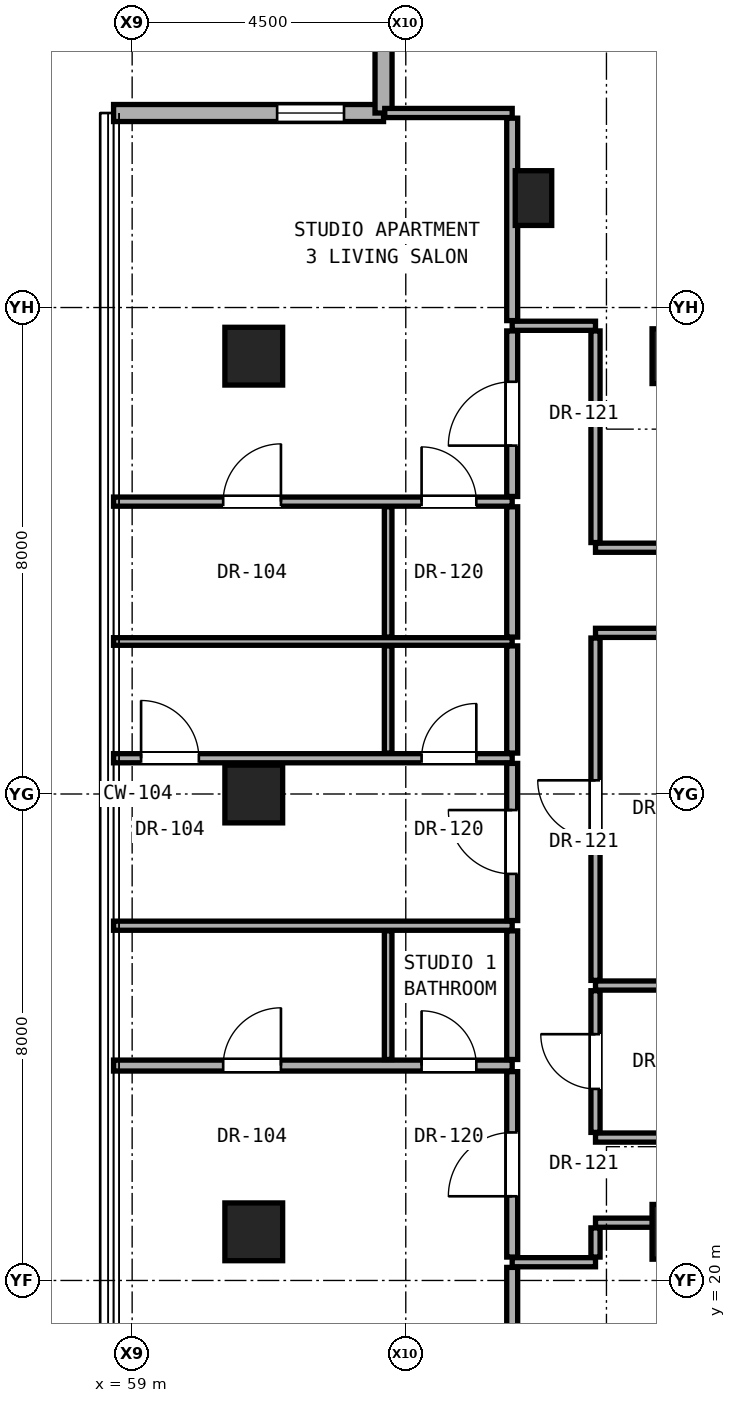
"""IFC4 building model, lengths in metres.
Left out: names, types, materials, properties, quantities, classifications, styles, units other than length and angle.
Written with IfcOpenShell. Run it as: python <this file> out.ifc"""

import sys

from ifc_helpers import new_model, si_unit, direction, frame, frame_2d, origin, origin_2d, place, context, subcontext, project, spatial, rectangle, hollow_rectangle, extrude, element, fill, save


model = new_model("IFC4")
c1 = context("Model", 3, precision=1e-05, world=origin(), true_north=direction((0.0, 1.0)))
c2 = subcontext(c1, "Body", "Model", "MODEL_VIEW")
j1 = project(units=[si_unit("LENGTHUNIT", "METRE"), si_unit("PLANEANGLEUNIT", "RADIAN")], contexts=[c1])
p1 = place(None, origin())
s1 = spatial("IfcSite", under=j1, at=p1, CompositionType="ELEMENT")
p2 = place(p1, origin())
s2 = spatial("IfcBuilding", under=s1, at=p2, CompositionType="ELEMENT")
p3 = place(p2, frame((0.0, 0.0, 203.15)))
s3 = spatial("IfcBuildingStorey", under=s2, at=p3, CompositionType="ELEMENT", Elevation=203.15)
for number, where, z_axis, x_axis in (
    (1, (68.0, 20.8, 0.0), (0.0, 0.0, 1.0), (1.0, 0.0, 0.0)),
    (2, (68.0, 35.2, 0.0), (0.0, 0.0, 1.0), (1.0, 0.0, 0.0)),
):
    element("IfcColumn", number, at=place(p3, frame(where, z_axis=z_axis, x_axis=x_axis)), inside=s3, PredefinedType="COLUMN", context=c2, shape_type="SweptSolid", body=[
        extrude(rectangle(XDim=0.9, YDim=0.9, at=origin_2d()), origin(), (0.0, 0.0, 1.0), 3.25),
    ])
for number, where, z_axis, x_axis in (
    (3, (61.0, 20.8, 0.0), (0.0, 0.0, 1.0), (1.0, 0.0, 0.0)),
    (4, (61.0, 28.0, 0.0), (0.0, 0.0, 1.0), (1.0, 0.0, 0.0)),
    (5, (61.0, 35.2, 0.0), (0.0, 0.0, 1.0), (1.0, 0.0, 0.0)),
):
    element("IfcColumn", number, at=place(p3, frame(where, z_axis=z_axis, x_axis=x_axis)), inside=s3, PredefinedType="COLUMN", context=c2, shape_type="SweptSolid", body=[
        extrude(hollow_rectangle(XDim=0.95, YDim=0.95, WallThickness=0.05, at=origin_2d()), origin(), (0.0, 0.0, 1.0), 3.25),
    ])
p4 = place(p3, frame((65.6, 37.8, 0.0), z_axis=(0.0, 0.0, 1.0), x_axis=(1.0, 0.0, 0.0)))
e6 = element("IfcColumn", 6, at=p4, inside=s3, PredefinedType="PILASTER", context=c2, shape_type="SweptSolid", body=[
    extrude(rectangle(XDim=0.6, YDim=0.9, at=origin_2d()), origin(), (0.0, 0.0, 1.0), 3.25),
])
p5 = place(p3, frame((63.134, 39.198, 0.0), z_axis=(0.0, 0.0, 1.0), x_axis=(-1.0, 0.0, 0.0)))
e7 = element("IfcWall", 7, at=p5, inside=s3, PredefinedType="SOLIDWALL", context=c2, shape_type="SweptSolid", body=[
    extrude(rectangle(XDim=4.44, YDim=0.28, at=frame_2d((2.22, 0.0))), origin(), (0.0, 0.0, 1.0), 3.03),
])
p6 = place(p5, frame((0.65, 0.0, 0.85)))
e8 = element("IfcOpeningElement", 8, at=p6, cuts=e7, PredefinedType="OPENING", context=c2, shape_type="SweptSolid", body=[
    extrude(rectangle(XDim=1.1, YDim=2.0, at=frame_2d((0.55, 1.0))), frame((0.0, 0.15, 0.0), z_axis=(0.0, -1.0, 0.0), x_axis=(1.0, 0.0, 0.0)), (0.0, 0.0, 1.0), 0.3),
])
p7 = place(p3, frame((63.134, 43.638, 0.0), z_axis=(0.0, 0.0, 1.0), x_axis=(0.0, -1.0, 0.0)))
e9 = element("IfcWall", 9, at=p7, inside=s3, PredefinedType="SOLIDWALL", context=c2, shape_type="SweptSolid", body=[
    extrude(rectangle(XDim=4.44, YDim=0.28, at=frame_2d((2.22, 0.0))), origin(), (0.0, 0.0, 1.0), 3.03),
])
p8 = place(p3, frame((65.25, 20.3, 0.0), z_axis=(0.0, 0.0, 1.0), x_axis=(1.0, 0.0, 0.0)))
e10 = element("IfcWall", 10, at=p8, inside=s3, PredefinedType="PARTITIONING", context=c2, shape_type="SweptSolid", body=[
    extrude(rectangle(XDim=1.37, YDim=0.15, at=frame_2d((0.685, 0.0))), origin(), (0.0, 0.0, 1.0), 3.05),
])
p9 = place(p3, frame((66.62, 20.95, 0.0), z_axis=(0.0, 0.0, 1.0), x_axis=(1.0, 0.0, 0.0)))
e11 = element("IfcWall", 11, at=p9, inside=s3, PredefinedType="PARTITIONING", context=c2, shape_type="SweptSolid", body=[
    extrude(rectangle(XDim=1.11, YDim=0.15, at=frame_2d((0.555, 0.0))), origin(), (0.0, 0.0, 1.0), 2.442),
])
p10 = place(p3, frame((66.62, 22.35, 0.0), z_axis=(0.0, 0.0, 1.0), x_axis=(1.0, 0.0, 0.0)))
e12 = element("IfcWall", 12, at=p10, inside=s3, PredefinedType="PARTITIONING", context=c2, shape_type="SweptSolid", body=[
    extrude(rectangle(XDim=10.14, YDim=0.15, at=frame_2d((5.07, 0.0))), origin(), (0.0, 0.0, 1.0), 2.186),
])
p11 = place(p3, frame((58.694, 23.534, 0.0), z_axis=(0.0, 0.0, 1.0), x_axis=(1.0, 0.0, 0.0)))
e13 = element("IfcWall", 13, at=p11, inside=s3, PredefinedType="PARTITIONING", context=c2, shape_type="SweptSolid", body=[
    extrude(rectangle(XDim=6.556, YDim=0.18, at=frame_2d((3.278, 0.0))), origin(), (0.0, 0.0, 1.0), 2.269),
])
p12 = place(p11, frame((1.803, 0.0, 0.0)))
e14 = element("IfcOpeningElement", 14, at=p12, cuts=e13, PredefinedType="OPENING", context=c2, shape_type="SweptSolid", body=[
    extrude(rectangle(XDim=0.95, YDim=2.15, at=frame_2d((0.475, 1.075))), frame((0.0, 0.1, 0.0), z_axis=(0.0, -1.0, 0.0), x_axis=(1.0, 0.0, 0.0)), (0.0, 0.0, 1.0), 0.2),
])
p13 = place(p11, frame((5.066, 0.0, 0.0)))
e15 = element("IfcOpeningElement", 15, at=p13, cuts=e13, PredefinedType="OPENING", context=c2, shape_type="SweptSolid", body=[
    extrude(rectangle(XDim=0.9, YDim=2.1, at=frame_2d((0.45, 1.05))), frame((0.0, 0.1, 0.0), z_axis=(0.0, -1.0, 0.0), x_axis=(1.0, 0.0, 0.0)), (0.0, 0.0, 1.0), 0.2),
])
p14 = place(p3, frame((66.62, 24.85, 0.0), z_axis=(0.0, 0.0, 1.0), x_axis=(1.0, 0.0, 0.0)))
e16 = element("IfcWall", 16, at=p14, inside=s3, PredefinedType="PARTITIONING", context=c2, shape_type="SweptSolid", body=[
    extrude(rectangle(XDim=3.13, YDim=0.15, at=frame_2d((1.565, 0.0))), origin(), (0.0, 0.0, 1.0), 2.186),
])
p15 = place(p3, frame((58.694, 25.834, 0.0), z_axis=(0.0, 0.0, 1.0), x_axis=(1.0, 0.0, 0.0)))
e17 = element("IfcWall", 17, at=p15, inside=s3, PredefinedType="PARTITIONING", context=c2, shape_type="SweptSolid", body=[
    extrude(rectangle(XDim=6.556, YDim=0.15, at=frame_2d((3.278, 0.0))), origin(), (0.0, 0.0, 1.0), 2.269),
])
p16 = place(p3, frame((58.694, 28.588, 0.0), z_axis=(0.0, 0.0, 1.0), x_axis=(1.0, 0.0, 0.0)))
e18 = element("IfcWall", 18, at=p16, inside=s3, PredefinedType="PARTITIONING", context=c2, shape_type="SweptSolid", body=[
    extrude(rectangle(XDim=6.556, YDim=0.15, at=frame_2d((3.278, 0.0))), origin(), (0.0, 0.0, 1.0), 2.269),
])
p17 = place(p16, frame((0.453, 0.0, 0.0)))
e19 = element("IfcOpeningElement", 19, at=p17, cuts=e18, PredefinedType="OPENING", context=c2, shape_type="SweptSolid", body=[
    extrude(rectangle(XDim=0.95, YDim=2.15, at=frame_2d((0.475, 1.075))), frame((0.0, 0.085, 0.0), z_axis=(0.0, -1.0, 0.0), x_axis=(1.0, 0.0, 0.0)), (0.0, 0.0, 1.0), 0.17),
])
p18 = place(p16, frame((5.066, 0.0, 0.0)))
e20 = element("IfcOpeningElement", 20, at=p18, cuts=e18, PredefinedType="OPENING", context=c2, shape_type="SweptSolid", body=[
    extrude(rectangle(XDim=0.9, YDim=2.1, at=frame_2d((0.45, 1.05))), frame((0.0, 0.085, 0.0), z_axis=(0.0, -1.0, 0.0), x_axis=(1.0, 0.0, 0.0)), (0.0, 0.0, 1.0), 0.17),
])
p19 = place(p3, frame((58.694, 30.508, 0.0), z_axis=(0.0, 0.0, 1.0), x_axis=(1.0, 0.0, 0.0)))
e21 = element("IfcWall", 21, at=p19, inside=s3, PredefinedType="PARTITIONING", context=c2, shape_type="SweptSolid", body=[
    extrude(rectangle(XDim=6.556, YDim=0.125, at=frame_2d((3.278, 0.0))), origin(), (0.0, 0.0, 1.0), 2.269),
])
p20 = place(p3, frame((66.62, 30.65, 0.0), z_axis=(0.0, 0.0, 1.0), x_axis=(1.0, 0.0, 0.0)))
e22 = element("IfcWall", 22, at=p20, inside=s3, PredefinedType="PARTITIONING", context=c2, shape_type="SweptSolid", body=[
    extrude(rectangle(XDim=10.14, YDim=0.15, at=frame_2d((5.07, 0.0))), origin(), (0.0, 0.0, 1.0), 2.186),
])
p21 = place(p20, frame((6.14, 0.0, 0.0)))
e23 = element("IfcOpeningElement", 23, at=p21, cuts=e22, PredefinedType="OPENING", context=c2, shape_type="SweptSolid", body=[
    extrude(rectangle(XDim=0.95, YDim=2.15, at=frame_2d((0.475, 1.075))), frame((0.0, 0.085, 0.0), z_axis=(0.0, -1.0, 0.0), x_axis=(1.0, 0.0, 0.0)), (0.0, 0.0, 1.0), 0.17),
])
p22 = place(p3, frame((66.62, 32.05, 0.0), z_axis=(0.0, 0.0, 1.0), x_axis=(1.0, 0.0, 0.0)))
e24 = element("IfcWall", 24, at=p22, inside=s3, PredefinedType="PARTITIONING", context=c2, shape_type="SweptSolid", body=[
    extrude(rectangle(XDim=2.18, YDim=0.15, at=frame_2d((1.09, 0.0))), origin(), (0.0, 0.0, 1.0), 2.186),
])
p23 = place(p3, frame((58.694, 32.808, 0.0), z_axis=(0.0, 0.0, 1.0), x_axis=(1.0, 0.0, 0.0)))
e25 = element("IfcWall", 25, at=p23, inside=s3, PredefinedType="PARTITIONING", context=c2, shape_type="SweptSolid", body=[
    extrude(rectangle(XDim=6.556, YDim=0.15, at=frame_2d((3.278, 0.0))), origin(), (0.0, 0.0, 1.0), 2.269),
])
p24 = place(p23, frame((1.803, 0.0, 0.0)))
e26 = element("IfcOpeningElement", 26, at=p24, cuts=e25, PredefinedType="OPENING", context=c2, shape_type="SweptSolid", body=[
    extrude(rectangle(XDim=0.95, YDim=2.15, at=frame_2d((0.475, 1.075))), frame((0.0, 0.085, 0.0), z_axis=(0.0, -1.0, 0.0), x_axis=(1.0, 0.0, 0.0)), (0.0, 0.0, 1.0), 0.17),
])
p25 = place(p23, frame((5.066, 0.0, 0.0)))
e27 = element("IfcOpeningElement", 27, at=p25, cuts=e25, PredefinedType="OPENING", context=c2, shape_type="SweptSolid", body=[
    extrude(rectangle(XDim=0.9, YDim=2.1, at=frame_2d((0.45, 1.05))), frame((0.0, 0.085, 0.0), z_axis=(0.0, -1.0, 0.0), x_axis=(1.0, 0.0, 0.0)), (0.0, 0.0, 1.0), 0.17),
])
p26 = place(p3, frame((65.25, 35.7, 0.0), z_axis=(0.0, 0.0, 1.0), x_axis=(1.0, 0.0, 0.0)))
e28 = element("IfcWall", 28, at=p26, inside=s3, PredefinedType="PARTITIONING", context=c2, shape_type="SweptSolid", body=[
    extrude(rectangle(XDim=1.37, YDim=0.15, at=frame_2d((0.685, 0.0))), origin(), (0.0, 0.0, 1.0), 3.05),
])
p27 = place(p3, frame((63.154, 39.199, 0.0), z_axis=(0.0, 0.0, 1.0), x_axis=(1.0, 0.0, 0.0)))
e29 = element("IfcWall", 29, at=p27, inside=s3, PredefinedType="PARTITIONING", context=c2, shape_type="SweptSolid", body=[
    extrude(rectangle(XDim=2.096, YDim=0.15, at=frame_2d((1.048, 0.0))), origin(), (0.0, 0.0, 1.0), 3.05),
])
p28 = place(p3, frame((63.21, 23.634, 0.0), z_axis=(0.0, 0.0, 1.0), x_axis=(0.0, 1.0, 0.0)))
e30 = element("IfcWall", 30, at=p28, inside=s3, PredefinedType="PARTITIONING", context=c2, shape_type="SweptSolid", body=[
    extrude(rectangle(XDim=2.115, YDim=0.125, at=frame_2d((1.058, 0.0))), origin(), (0.0, 0.0, 1.0), 3.05),
])
p29 = place(p3, frame((63.21, 28.673, 0.0), z_axis=(0.0, 0.0, 1.0), x_axis=(0.0, 1.0, 0.0)))
e31 = element("IfcWall", 31, at=p29, inside=s3, PredefinedType="PARTITIONING", context=c2, shape_type="SweptSolid", body=[
    extrude(rectangle(XDim=1.762, YDim=0.125, at=frame_2d((0.881, 0.0))), origin(), (0.0, 0.0, 1.0), 3.05),
])
p30 = place(p3, frame((63.21, 30.581, 0.0), z_axis=(0.0, 0.0, 1.0), x_axis=(0.0, 1.0, 0.0)))
e32 = element("IfcWall", 32, at=p30, inside=s3, PredefinedType="PARTITIONING", context=c2, shape_type="SweptSolid", body=[
    extrude(rectangle(XDim=2.142, YDim=0.125, at=frame_2d((1.071, 0.0))), origin(), (0.0, 0.0, 1.0), 3.05),
])
p31 = place(p3, frame((65.25, 16.901, 0.0), z_axis=(0.0, 0.0, 1.0), x_axis=(0.0, 1.0, 0.0)))
e33 = element("IfcWall", 33, at=p31, inside=s3, PredefinedType="PARTITIONING", context=c2, shape_type="SweptSolid", body=[
    extrude(rectangle(XDim=3.314, YDim=0.18, at=frame_2d((1.657, 0.0))), origin(), (0.0, 0.0, 1.0), 2.493),
])
p32 = place(p3, frame((65.25, 20.385, 0.0), z_axis=(0.0, 0.0, 1.0), x_axis=(0.0, 1.0, 0.0)))
e34 = element("IfcWall", 34, at=p32, inside=s3, PredefinedType="PARTITIONING", context=c2, shape_type="SweptSolid", body=[
    extrude(rectangle(XDim=3.049, YDim=0.18, at=frame_2d((1.524, 0.0))), origin(), (0.0, 0.0, 1.0), 2.442),
])
p33 = place(p32, frame((1.0, 0.0, 0.0)))
e35 = element("IfcOpeningElement", 35, at=p33, cuts=e34, PredefinedType="OPENING", context=c2, shape_type="SweptSolid", body=[
    extrude(rectangle(XDim=1.05, YDim=2.2, at=frame_2d((0.525, 1.1))), frame((0.0, 0.1, 0.0), z_axis=(0.0, -1.0, 0.0), x_axis=(1.0, 0.0, 0.0)), (0.0, 0.0, 1.0), 0.2),
])
p34 = place(p3, frame((65.25, 23.634, 0.0), z_axis=(0.0, 0.0, 1.0), x_axis=(0.0, 1.0, 0.0)))
e36 = element("IfcWall", 36, at=p34, inside=s3, PredefinedType="PARTITIONING", context=c2, shape_type="SweptSolid", body=[
    extrude(rectangle(XDim=2.115, YDim=0.18, at=frame_2d((1.058, 0.0))), origin(), (0.0, 0.0, 1.0), 3.05),
])
p35 = place(p3, frame((65.25, 25.919, 0.0), z_axis=(0.0, 0.0, 1.0), x_axis=(0.0, 1.0, 0.0)))
e37 = element("IfcWall", 37, at=p35, inside=s3, PredefinedType="PARTITIONING", context=c2, shape_type="SweptSolid", body=[
    extrude(rectangle(XDim=2.584, YDim=0.18, at=frame_2d((1.292, 0.0))), origin(), (0.0, 0.0, 1.0), 2.346),
])
p36 = place(p35, frame((0.767, 0.0, 0.0)))
e38 = element("IfcOpeningElement", 38, at=p36, cuts=e37, PredefinedType="OPENING", context=c2, shape_type="SweptSolid", body=[
    extrude(rectangle(XDim=1.05, YDim=2.2, at=frame_2d((0.525, 1.1))), frame((0.0, 0.1, 0.0), z_axis=(0.0, -1.0, 0.0), x_axis=(1.0, 0.0, 0.0)), (0.0, 0.0, 1.0), 0.2),
])
p37 = place(p3, frame((65.25, 28.673, 0.0), z_axis=(0.0, 0.0, 1.0), x_axis=(0.0, 1.0, 0.0)))
e39 = element("IfcWall", 39, at=p37, inside=s3, PredefinedType="PARTITIONING", context=c2, shape_type="SweptSolid", body=[
    extrude(rectangle(XDim=1.762, YDim=0.18, at=frame_2d((0.881, 0.0))), origin(), (0.0, 0.0, 1.0), 3.05),
])
p38 = place(p3, frame((65.25, 30.581, 0.0), z_axis=(0.0, 0.0, 1.0), x_axis=(0.0, 1.0, 0.0)))
e40 = element("IfcWall", 40, at=p38, inside=s3, PredefinedType="PARTITIONING", context=c2, shape_type="SweptSolid", body=[
    extrude(rectangle(XDim=2.142, YDim=0.18, at=frame_2d((1.071, 0.0))), origin(), (0.0, 0.0, 1.0), 3.05),
])
p39 = place(p3, frame((65.25, 32.893, 0.0), z_axis=(0.0, 0.0, 1.0), x_axis=(0.0, 1.0, 0.0)))
e41 = element("IfcWall", 41, at=p39, inside=s3, PredefinedType="PARTITIONING", context=c2, shape_type="SweptSolid", body=[
    extrude(rectangle(XDim=2.722, YDim=0.18, at=frame_2d((1.361, 0.0))), origin(), (0.0, 0.0, 1.0), 2.442),
])
p40 = place(p39, frame((0.836, 0.0, 0.0)))
e42 = element("IfcOpeningElement", 42, at=p40, cuts=e41, PredefinedType="OPENING", context=c2, shape_type="SweptSolid", body=[
    extrude(rectangle(XDim=1.05, YDim=2.2, at=frame_2d((0.525, 1.1))), frame((0.0, 0.1, 0.0), z_axis=(0.0, -1.0, 0.0), x_axis=(1.0, 0.0, 0.0)), (0.0, 0.0, 1.0), 0.2),
])
p41 = place(p3, frame((65.25, 35.785, 0.0), z_axis=(0.0, 0.0, 1.0), x_axis=(0.0, 1.0, 0.0)))
e43 = element("IfcWall", 43, at=p41, inside=s3, PredefinedType="PARTITIONING", context=c2, shape_type="SweptSolid", body=[
    extrude(rectangle(XDim=3.329, YDim=0.18, at=frame_2d((1.665, 0.0))), origin(), (0.0, 0.0, 1.0), 2.493),
])
p42 = place(p3, frame((66.62, 20.385, 0.0), z_axis=(0.0, 0.0, 1.0), x_axis=(0.0, 1.0, 0.0)))
e44 = element("IfcWall", 44, at=p42, inside=s3, PredefinedType="PARTITIONING", context=c2, shape_type="SweptSolid", body=[
    extrude(rectangle(XDim=0.48, YDim=0.15, at=frame_2d((0.24, 0.0))), origin(), (0.0, 0.0, 1.0), 2.442),
])
p43 = place(p3, frame((66.62, 22.435, 0.0), z_axis=(0.0, 0.0, 1.0), x_axis=(0.0, 1.0, 0.0)))
e45 = element("IfcWall", 45, at=p43, inside=s3, PredefinedType="PARTITIONING", context=c2, shape_type="SweptSolid", body=[
    extrude(rectangle(XDim=2.33, YDim=0.15, at=frame_2d((1.165, 0.0))), origin(), (0.0, 0.0, 1.0), 3.05),
])
p44 = place(p43, frame((0.715, 0.0, 0.0)))
e46 = element("IfcOpeningElement", 46, at=p44, cuts=e45, PredefinedType="OPENING", context=c2, shape_type="SweptSolid", body=[
    extrude(rectangle(XDim=0.9, YDim=2.1, at=frame_2d((0.45, 1.05))), frame((0.0, 0.085, 0.0), z_axis=(0.0, -1.0, 0.0), x_axis=(1.0, 0.0, 0.0)), (0.0, 0.0, 1.0), 0.17),
])
p45 = place(p3, frame((66.62, 24.935, 0.0), z_axis=(0.0, 0.0, 1.0), x_axis=(0.0, 1.0, 0.0)))
e47 = element("IfcWall", 47, at=p45, inside=s3, PredefinedType="PARTITIONING", context=c2, shape_type="SweptSolid", body=[
    extrude(rectangle(XDim=5.63, YDim=0.15, at=frame_2d((2.815, 0.0))), origin(), (0.0, 0.0, 1.0), 2.346),
])
p46 = place(p45, frame((2.34, 0.0, 0.0)))
e48 = element("IfcOpeningElement", 48, at=p46, cuts=e47, PredefinedType="OPENING", context=c2, shape_type="SweptSolid", body=[
    extrude(rectangle(XDim=0.95, YDim=2.15, at=frame_2d((0.475, 1.075))), frame((0.0, 0.085, 0.0), z_axis=(0.0, -1.0, 0.0), x_axis=(1.0, 0.0, 0.0)), (0.0, 0.0, 1.0), 0.17),
])
p47 = place(p3, frame((66.62, 32.135, 0.0), z_axis=(0.0, 0.0, 1.0), x_axis=(0.0, 1.0, 0.0)))
e49 = element("IfcWall", 49, at=p47, inside=s3, PredefinedType="PARTITIONING", context=c2, shape_type="SweptSolid", body=[
    extrude(rectangle(XDim=3.48, YDim=0.15, at=frame_2d((1.74, 0.0))), origin(), (0.0, 0.0, 1.0), 2.442),
])
p48 = place(p6, origin())
e50 = element("IfcWindow", 50, at=p48, inside=s3, PartitioningType="SINGLE_PANEL", PredefinedType="WINDOW", context=c2, shape_type="SweptSolid", body=[
    extrude(rectangle(XDim=1.1, YDim=2.0, at=frame_2d((0.55, 1.0))), frame((0.0, 0.03, 0.0), z_axis=(0.0, -1.0, 0.0), x_axis=(1.0, 0.0, 0.0)), (0.0, 0.0, 1.0), 0.06),
])
fill(e8, e50)
p49 = place(p44, origin())
e51 = element("IfcDoor", 51, at=p49, inside=s3, OperationType="SINGLE_SWING_RIGHT", PredefinedType="DOOR", context=c2, shape_type="SweptSolid", body=[
    extrude(rectangle(XDim=0.9, YDim=2.1, at=frame_2d((0.45, 1.05))), frame((0.0, 0.025, 0.0), z_axis=(0.0, -1.0, 0.0), x_axis=(1.0, 0.0, 0.0)), (0.0, 0.0, 1.0), 0.05),
])
fill(e46, e51)
p50 = place(p33, origin())
e52 = element("IfcDoor", 52, at=p50, inside=s3, OperationType="SINGLE_SWING_LEFT", PredefinedType="DOOR", context=c2, shape_type="SweptSolid", body=[
    extrude(rectangle(XDim=1.05, YDim=2.2, at=frame_2d((0.525, 1.1))), frame((0.0, 0.025, 0.0), z_axis=(0.0, -1.0, 0.0), x_axis=(1.0, 0.0, 0.0)), (0.0, 0.0, 1.0), 0.05),
])
fill(e35, e52)
p51 = place(p12, origin())
e53 = element("IfcDoor", 53, at=p51, inside=s3, OperationType="SINGLE_SWING_RIGHT", PredefinedType="DOOR", context=c2, shape_type="SweptSolid", body=[
    extrude(rectangle(XDim=0.95, YDim=2.15, at=frame_2d((0.475, 1.075))), frame((0.0, 0.025, 0.0), z_axis=(0.0, -1.0, 0.0), x_axis=(1.0, 0.0, 0.0)), (0.0, 0.0, 1.0), 0.05),
])
fill(e14, e53)
p52 = place(p13, origin())
e54 = element("IfcDoor", 54, at=p52, inside=s3, OperationType="SINGLE_SWING_LEFT", PredefinedType="DOOR", context=c2, shape_type="SweptSolid", body=[
    extrude(rectangle(XDim=0.9, YDim=2.1, at=frame_2d((0.45, 1.05))), frame((0.0, 0.025, 0.0), z_axis=(0.0, -1.0, 0.0), x_axis=(1.0, 0.0, 0.0)), (0.0, 0.0, 1.0), 0.05),
])
fill(e15, e54)
p53 = place(p36, origin())
e55 = element("IfcDoor", 55, at=p53, inside=s3, OperationType="SINGLE_SWING_RIGHT", PredefinedType="DOOR", context=c2, shape_type="SweptSolid", body=[
    extrude(rectangle(XDim=1.05, YDim=2.2, at=frame_2d((0.525, 1.1))), frame((0.0, 0.025, 0.0), z_axis=(0.0, -1.0, 0.0), x_axis=(1.0, 0.0, 0.0)), (0.0, 0.0, 1.0), 0.05),
])
fill(e38, e55)
p54 = place(p17, origin())
e56 = element("IfcDoor", 56, at=p54, inside=s3, OperationType="SINGLE_SWING_LEFT", PredefinedType="DOOR", context=c2, shape_type="SweptSolid", body=[
    extrude(rectangle(XDim=0.95, YDim=2.15, at=frame_2d((0.475, 1.075))), frame((0.0, 0.025, 0.0), z_axis=(0.0, -1.0, 0.0), x_axis=(1.0, 0.0, 0.0)), (0.0, 0.0, 1.0), 0.05),
])
fill(e19, e56)
p55 = place(p18, origin())
e57 = element("IfcDoor", 57, at=p55, inside=s3, OperationType="SINGLE_SWING_RIGHT", PredefinedType="DOOR", context=c2, shape_type="SweptSolid", body=[
    extrude(rectangle(XDim=0.9, YDim=2.1, at=frame_2d((0.45, 1.05))), frame((0.0, 0.025, 0.0), z_axis=(0.0, -1.0, 0.0), x_axis=(1.0, 0.0, 0.0)), (0.0, 0.0, 1.0), 0.05),
])
fill(e20, e57)
p56 = place(p40, origin())
e58 = element("IfcDoor", 58, at=p56, inside=s3, OperationType="SINGLE_SWING_LEFT", PredefinedType="DOOR", context=c2, shape_type="SweptSolid", body=[
    extrude(rectangle(XDim=1.05, YDim=2.2, at=frame_2d((0.525, 1.1))), frame((0.0, 0.025, 0.0), z_axis=(0.0, -1.0, 0.0), x_axis=(1.0, 0.0, 0.0)), (0.0, 0.0, 1.0), 0.05),
])
fill(e42, e58)
p57 = place(p24, origin())
e59 = element("IfcDoor", 59, at=p57, inside=s3, OperationType="SINGLE_SWING_RIGHT", PredefinedType="DOOR", context=c2, shape_type="SweptSolid", body=[
    extrude(rectangle(XDim=0.95, YDim=2.15, at=frame_2d((0.475, 1.075))), frame((0.0, 0.025, 0.0), z_axis=(0.0, -1.0, 0.0), x_axis=(1.0, 0.0, 0.0)), (0.0, 0.0, 1.0), 0.05),
])
fill(e26, e59)
p58 = place(p25, origin())
e60 = element("IfcDoor", 60, at=p58, inside=s3, OperationType="SINGLE_SWING_LEFT", PredefinedType="DOOR", context=c2, shape_type="SweptSolid", body=[
    extrude(rectangle(XDim=0.9, YDim=2.1, at=frame_2d((0.45, 1.05))), frame((0.0, 0.025, 0.0), z_axis=(0.0, -1.0, 0.0), x_axis=(1.0, 0.0, 0.0)), (0.0, 0.0, 1.0), 0.05),
])
fill(e27, e60)
p59 = place(p46, origin())
e61 = element("IfcDoor", 61, at=p59, inside=s3, OperationType="SINGLE_SWING_RIGHT", PredefinedType="DOOR", context=c2, shape_type="SweptSolid", body=[
    extrude(rectangle(XDim=0.95, YDim=2.15, at=frame_2d((0.475, 1.075))), frame((0.0, 0.025, 0.0), z_axis=(0.0, -1.0, 0.0), x_axis=(1.0, 0.0, 0.0)), (0.0, 0.0, 1.0), 0.05),
])
fill(e48, e61)
save(model, sys.argv[1])
